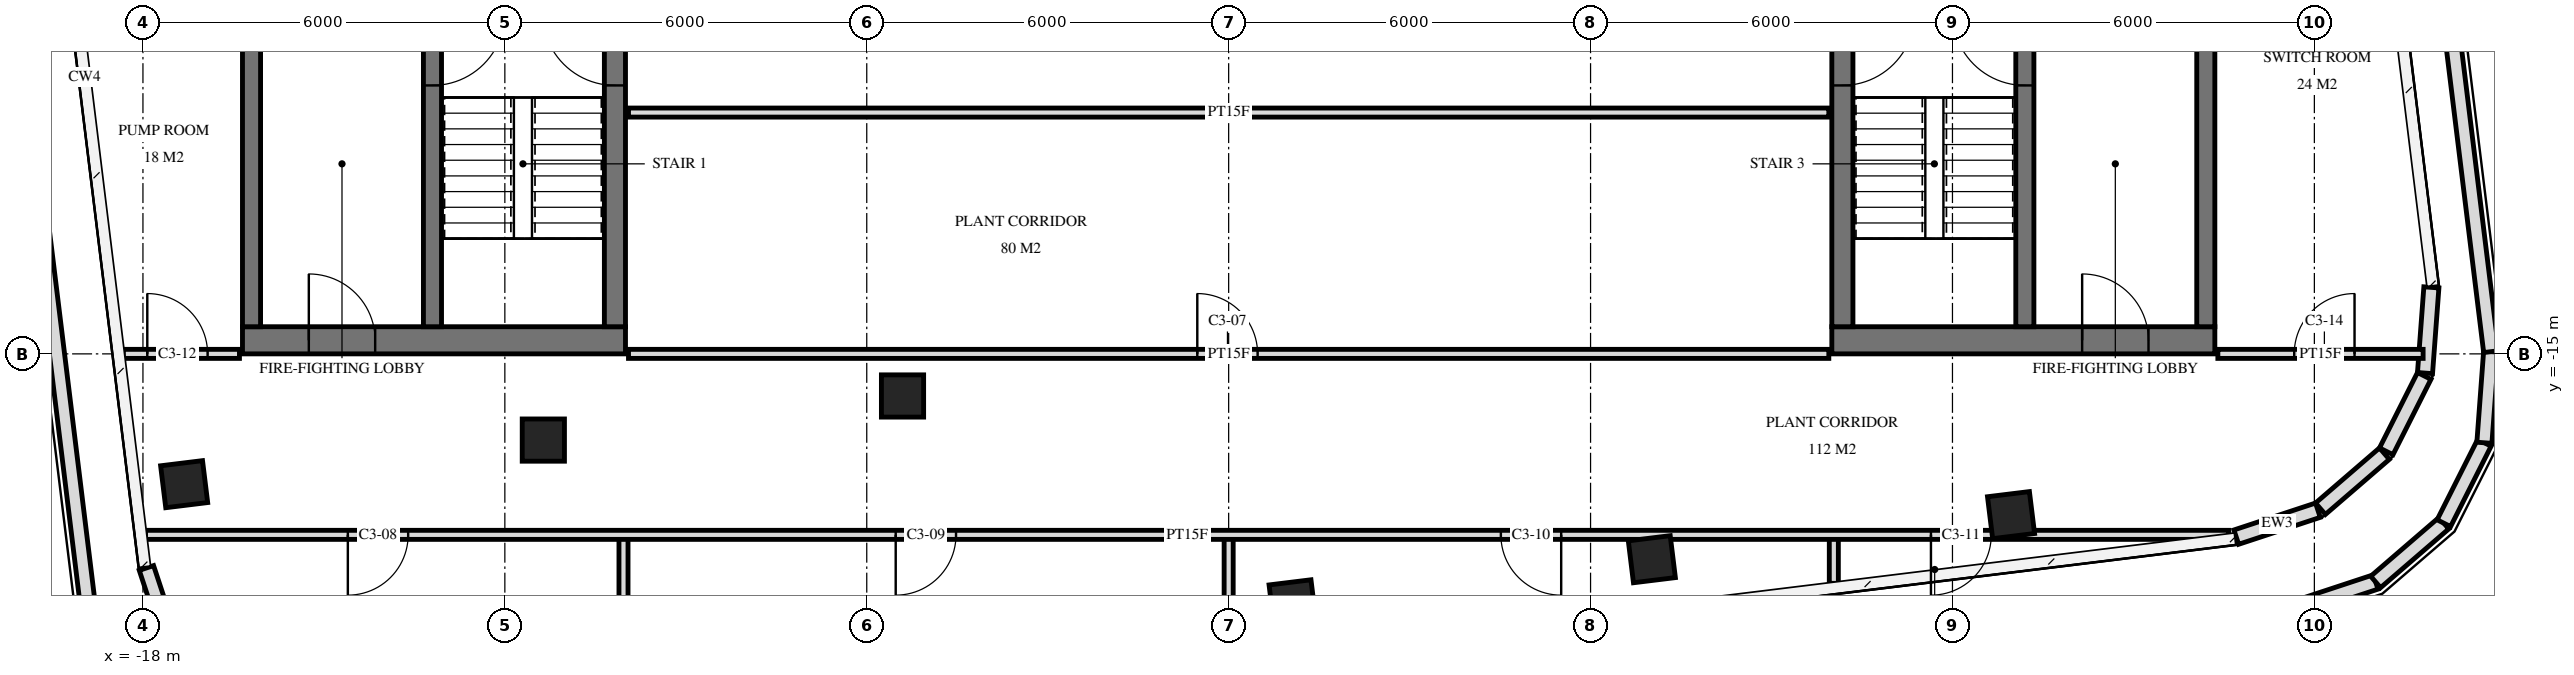
"""IFC4 building model, lengths in metres.
Left out: names, types, materials, properties, quantities, classifications, styles, units other than length and angle.
Written with IfcOpenShell. Run it as: python <this file> out.ifc"""

import sys

from ifc_helpers import new_model, si_unit, direction, frame, frame_2d, origin, origin_2d, place, context, subcontext, project, spatial, rectangle, extrude, element, fill, save


model = new_model("IFC4")
c1 = context("Model", 3, precision=1e-05, world=origin(), true_north=direction((0.0, 1.0)))
c2 = subcontext(c1, "Body", "Model", "MODEL_VIEW")
j1 = project(units=[si_unit("LENGTHUNIT", "METRE"), si_unit("PLANEANGLEUNIT", "RADIAN")], contexts=[c1])
p1 = place(None, origin())
s1 = spatial("IfcSite", under=j1, at=p1, CompositionType="ELEMENT")
p2 = place(p1, origin())
s2 = spatial("IfcBuilding", under=s1, at=p2, CompositionType="ELEMENT")
p3 = place(p2, frame((0.0, 0.0, 353.8)))
s3 = spatial("IfcBuildingStorey", under=s2, at=p3, CompositionType="ELEMENT", Elevation=353.8)
for number, where, z_axis, x_axis in (
    (1, (-17.317, -17.16, 0.0), (0.0, 0.0, 1.0), (-0.122, 0.993, 0.0)),
    (2, (-11.362, -16.429, 0.0), (0.0, 0.0, 1.0), (1.0, 0.0, 0.0)),
    (3, (-5.407, -15.698, 0.0), (0.0, 0.0, 1.0), (1.0, 0.0, 0.0)),
    (4, (1.06, -19.135, 0.0), (0.0, 0.0, 1.0), (0.993, 0.122, 0.0)),
    (5, (7.016, -18.404, 0.0), (0.0, 0.0, 1.0), (0.993, 0.122, 0.0)),
    (6, (12.971, -17.673, 0.0), (0.0, 0.0, 1.0), (0.993, 0.122, 0.0)),
):
    element("IfcColumn", number, at=place(p3, frame(where, z_axis=z_axis, x_axis=x_axis)), inside=s3, PredefinedType="COLUMN", context=c2, shape_type="SweptSolid", body=[
        extrude(rectangle(XDim=0.7, YDim=0.7, at=origin_2d()), origin(), (0.0, 0.0, 1.0), 3.6),
    ])
p4 = place(p3, frame((-16.35, -14.775, 0.0), z_axis=(0.0, 0.0, 1.0), x_axis=(1.0, 0.0, 0.0)))
e7 = element("IfcWall", 7, at=p4, inside=s3, PredefinedType="SHEAR", context=c2, shape_type="SweptSolid", body=[
    extrude(rectangle(XDim=6.35, YDim=0.45, at=frame_2d((3.175, 0.0))), origin(), (0.0, 0.0, 1.0), 3.6),
])
p5 = place(p4, frame((1.1, 0.0, 0.0)))
e8 = element("IfcOpeningElement", 8, at=p5, cuts=e7, PredefinedType="OPENING", context=c2, shape_type="SweptSolid", body=[
    extrude(rectangle(XDim=1.1, YDim=2.1, at=frame_2d((0.55, 1.05))), frame((0.0, 0.235, 0.0), z_axis=(0.0, -1.0, 0.0), x_axis=(1.0, 0.0, 0.0)), (0.0, 0.0, 1.0), 0.47),
])
p6 = place(p3, frame((-10.175, -14.55, 0.0), z_axis=(0.0, 0.0, 1.0), x_axis=(0.0, 1.0, 0.0)))
e9 = element("IfcWall", 9, at=p6, inside=s3, PredefinedType="SHEAR", context=c2, shape_type="SweptSolid", body=[
    extrude(rectangle(XDim=14.1, YDim=0.35, at=frame_2d((7.05, 0.0))), origin(), (0.0, 0.0, 1.0), 3.6),
])
p7 = place(p6, frame((4.0, 0.0, 0.0)))
e10 = element("IfcOpeningElement", 10, at=p7, cuts=e9, PredefinedType="OPENING", context=c2, shape_type="SweptSolid", body=[
    extrude(rectangle(XDim=1.2, YDim=2.1, at=frame_2d((0.6, 1.05))), frame((0.0, 0.185, 0.0), z_axis=(0.0, -1.0, 0.0), x_axis=(1.0, 0.0, 0.0)), (0.0, 0.0, 1.0), 0.37),
])
p8 = place(p3, frame((-16.2, -14.55, 0.0), z_axis=(0.0, 0.0, 1.0), x_axis=(0.0, 1.0, 0.0)))
e11 = element("IfcWall", 11, at=p8, inside=s3, PredefinedType="SHEAR", context=c2, shape_type="SweptSolid", body=[
    extrude(rectangle(XDim=5.4, YDim=0.3, at=frame_2d((2.7, 0.0))), origin(), (0.0, 0.0, 1.0), 3.6),
])
p9 = place(p3, frame((-13.2, -14.55, 0.0), z_axis=(0.0, 0.0, 1.0), x_axis=(0.0, 1.0, 0.0)))
e12 = element("IfcWall", 12, at=p9, inside=s3, PredefinedType="SHEAR", context=c2, shape_type="SweptSolid", body=[
    extrude(rectangle(XDim=5.4, YDim=0.3, at=frame_2d((2.7, 0.0))), origin(), (0.0, 0.0, 1.0), 3.6),
])
p10 = place(p9, frame((4.0, 0.0, 0.0)))
e13 = element("IfcOpeningElement", 13, at=p10, cuts=e12, PredefinedType="OPENING", context=c2, shape_type="SweptSolid", body=[
    extrude(rectangle(XDim=1.2, YDim=2.1, at=frame_2d((0.6, 1.05))), frame((0.0, 0.16, 0.0), z_axis=(0.0, -1.0, 0.0), x_axis=(1.0, 0.0, 0.0)), (0.0, 0.0, 1.0), 0.32),
])
p11 = place(p3, frame((10.0, -14.775, 0.0), z_axis=(0.0, 0.0, 1.0), x_axis=(1.0, 0.0, 0.0)))
e14 = element("IfcWall", 14, at=p11, inside=s3, PredefinedType="SHEAR", context=c2, shape_type="SweptSolid", body=[
    extrude(rectangle(XDim=6.35, YDim=0.45, at=frame_2d((3.175, 0.0))), origin(), (0.0, 0.0, 1.0), 3.6),
])
p12 = place(p11, frame((4.15, 0.0, 0.0)))
e15 = element("IfcOpeningElement", 15, at=p12, cuts=e14, PredefinedType="OPENING", context=c2, shape_type="SweptSolid", body=[
    extrude(rectangle(XDim=1.1, YDim=2.1, at=frame_2d((0.55, 1.05))), frame((0.0, 0.235, 0.0), z_axis=(0.0, -1.0, 0.0), x_axis=(1.0, 0.0, 0.0)), (0.0, 0.0, 1.0), 0.47),
])
p13 = place(p3, frame((10.175, -14.55, 0.0), z_axis=(0.0, 0.0, 1.0), x_axis=(0.0, 1.0, 0.0)))
e16 = element("IfcWall", 16, at=p13, inside=s3, PredefinedType="SHEAR", context=c2, shape_type="SweptSolid", body=[
    extrude(rectangle(XDim=14.1, YDim=0.35, at=frame_2d((7.05, 0.0))), origin(), (0.0, 0.0, 1.0), 3.6),
])
p14 = place(p13, frame((4.0, 0.0, 0.0)))
e17 = element("IfcOpeningElement", 17, at=p14, cuts=e16, PredefinedType="OPENING", context=c2, shape_type="SweptSolid", body=[
    extrude(rectangle(XDim=1.2, YDim=2.1, at=frame_2d((0.6, 1.05))), frame((0.0, 0.185, 0.0), z_axis=(0.0, -1.0, 0.0), x_axis=(1.0, 0.0, 0.0)), (0.0, 0.0, 1.0), 0.37),
])
p15 = place(p3, frame((16.2, -14.55, 0.0), z_axis=(0.0, 0.0, 1.0), x_axis=(0.0, 1.0, 0.0)))
e18 = element("IfcWall", 18, at=p15, inside=s3, PredefinedType="SHEAR", context=c2, shape_type="SweptSolid", body=[
    extrude(rectangle(XDim=5.4, YDim=0.3, at=frame_2d((2.7, 0.0))), origin(), (0.0, 0.0, 1.0), 3.6),
])
p16 = place(p3, frame((13.2, -14.55, 0.0), z_axis=(0.0, 0.0, 1.0), x_axis=(0.0, 1.0, 0.0)))
e19 = element("IfcWall", 19, at=p16, inside=s3, PredefinedType="SHEAR", context=c2, shape_type="SweptSolid", body=[
    extrude(rectangle(XDim=5.4, YDim=0.3, at=frame_2d((2.7, 0.0))), origin(), (0.0, 0.0, 1.0), 3.6),
])
p17 = place(p16, frame((4.0, 0.0, 0.0)))
e20 = element("IfcOpeningElement", 20, at=p17, cuts=e19, PredefinedType="OPENING", context=c2, shape_type="SweptSolid", body=[
    extrude(rectangle(XDim=1.2, YDim=2.1, at=frame_2d((0.6, 1.05))), frame((0.0, 0.16, 0.0), z_axis=(0.0, -1.0, 0.0), x_axis=(1.0, 0.0, 0.0)), (0.0, 0.0, 1.0), 0.32),
])
p18 = place(p3, frame((-17.942, -18.549, 0.0), z_axis=(0.0, 0.0, 1.0), x_axis=(0.313193586641, -0.949689305661, 0.0)))
e21 = element("IfcWall", 21, at=p18, inside=s3, PredefinedType="SOLIDWALL", context=c2, shape_type="SweptSolid", body=[
    extrude(rectangle(XDim=1.425, YDim=0.25, at=frame_2d((0.712, 0.0))), origin(), (0.0, 0.0, 1.0), 3.32),
])
p19 = place(p3, frame((16.706, -18.038, 0.0), z_axis=(0.0, 0.0, 1.0), x_axis=(0.949723461674, 0.313089997199, 0.0)))
e22 = element("IfcWall", 22, at=p19, inside=s3, PredefinedType="SOLIDWALL", context=c2, shape_type="SweptSolid", body=[
    extrude(rectangle(XDim=1.425, YDim=0.25, at=frame_2d((0.712, 0.0))), origin(), (0.0, 0.0, 1.0), 3.32),
])
p20 = place(p3, frame((18.101, -17.567, 0.0), z_axis=(0.0, 0.0, 1.0), x_axis=(0.757579494449, 0.652742912325, 0.0)))
e23 = element("IfcWall", 23, at=p20, inside=s3, PredefinedType="SOLIDWALL", context=c2, shape_type="SweptSolid", body=[
    extrude(rectangle(XDim=1.4, YDim=0.25, at=frame_2d((0.7, 0.0))), origin(), (0.0, 0.0, 1.0), 3.32),
])
p21 = place(p3, frame((19.191, -16.615, 0.0), z_axis=(0.0, 0.0, 1.0), x_axis=(0.450072232014, 0.892992153364, 0.0)))
e24 = element("IfcWall", 24, at=p21, inside=s3, PredefinedType="SOLIDWALL", context=c2, shape_type="SweptSolid", body=[
    extrude(rectangle(XDim=1.399, YDim=0.25, at=frame_2d((0.7, 0.0))), origin(), (0.0, 0.0, 1.0), 3.32),
])
p22 = place(p3, frame((19.834, -15.318, 0.0), z_axis=(0.0, 0.0, 1.0), x_axis=(0.074035815757, 0.99725558308, 0.0)))
e25 = element("IfcWall", 25, at=p22, inside=s3, PredefinedType="SOLIDWALL", context=c2, shape_type="SweptSolid", body=[
    extrude(rectangle(XDim=1.425, YDim=0.25, at=frame_2d((0.712, 0.0))), origin(), (0.0, 0.0, 1.0), 3.32),
])
p23 = place(p3, frame((18.83, 2.145, 0.0), z_axis=(0.0, 0.0, 1.0), x_axis=(0.121867555864, -0.992546371122, 0.0)))
e26 = element("IfcWall", 26, at=p23, inside=s3, PredefinedType="PARAPET", context=c2, shape_type="SweptSolid", body=[
    extrude(rectangle(XDim=17.237, YDim=0.25, at=frame_2d((8.618, 0.0))), origin(), (0.0, 0.0, 1.0), 1.1),
])
p24 = place(p3, frame((20.931, -14.963, 0.0), z_axis=(0.0, 0.0, 1.0), x_axis=(-0.074132878365, -0.997248372446, 0.0)))
e27 = element("IfcWall", 27, at=p24, inside=s3, PredefinedType="PARAPET", context=c2, shape_type="SweptSolid", body=[
    extrude(rectangle(XDim=1.515, YDim=0.25, at=frame_2d((0.757, 0.0))), origin(), (0.0, 0.0, 1.0), 1.1),
])
for number, where, z_axis, x_axis in (
    (28, (20.819, -16.474, 0.0), (0.0, 0.0, 1.0), (-0.45, -0.893, 0.0)),
    (29, (20.147, -17.807, 0.0), (0.0, 0.0, 1.0), (-0.758, -0.653, 0.0)),
):
    element("IfcWall", number, at=place(p3, frame(where, z_axis=z_axis, x_axis=x_axis)), inside=s3, PredefinedType="PARAPET", context=c2, shape_type="SweptSolid", body=[
        extrude(rectangle(XDim=1.492, YDim=0.25, at=frame_2d((0.746, 0.0))), origin(), (0.0, 0.0, 1.0), 1.1),
    ])
p25 = place(p3, frame((19.016, -18.781, 0.0), z_axis=(0.0, 0.0, 1.0), x_axis=(-0.949661734295, -0.313277178257, 0.0)))
e30 = element("IfcWall", 30, at=p25, inside=s3, PredefinedType="PARAPET", context=c2, shape_type="SweptSolid", body=[
    extrude(rectangle(XDim=1.515, YDim=0.25, at=frame_2d((0.757, 0.0))), origin(), (0.0, 0.0, 1.0), 1.1),
])
p26 = place(p3, frame((-18.83, -19.845, 0.0), z_axis=(0.0, 0.0, 1.0), x_axis=(-0.121865842614, 0.992546581478, 0.0)))
e31 = element("IfcWall", 31, at=p26, inside=s3, PredefinedType="PARAPET", context=c2, shape_type="SweptSolid", body=[
    extrude(rectangle(XDim=17.237, YDim=0.25, at=frame_2d((8.618, 0.0))), origin(), (0.0, 0.0, 1.0), 1.1),
])
p27 = place(p3, frame((10.033, -18.804, 0.0), z_axis=(0.0, 0.0, 1.0), x_axis=(0.0, 1.0, 0.0)))
e32 = element("IfcWall", 32, at=p27, inside=s3, PredefinedType="PARTITIONING", context=c2, shape_type="SweptSolid", body=[
    extrude(rectangle(XDim=0.804, YDim=0.15, at=frame_2d((0.402, 0.0))), origin(), (0.0, 0.0, 1.0), 3.32),
])
p28 = place(p3, frame((0.0, -20.036, 0.0), z_axis=(0.0, 0.0, 1.0), x_axis=(0.0, 1.0, 0.0)))
e33 = element("IfcWall", 33, at=p28, inside=s3, PredefinedType="PARTITIONING", context=c2, shape_type="SweptSolid", body=[
    extrude(rectangle(XDim=2.036, YDim=0.15, at=frame_2d((1.018, 0.0))), origin(), (0.0, 0.0, 1.0), 3.32),
])
p29 = place(p3, frame((-10.033, -21.268, 0.0), z_axis=(0.0, 0.0, 1.0), x_axis=(0.0, 1.0, 0.0)))
e34 = element("IfcWall", 34, at=p29, inside=s3, PredefinedType="PARTITIONING", context=c2, shape_type="SweptSolid", body=[
    extrude(rectangle(XDim=3.268, YDim=0.15, at=frame_2d((1.634, 0.0))), origin(), (0.0, 0.0, 1.0), 3.32),
])
p30 = place(p3, frame((-17.957, -18.0, 0.0), z_axis=(0.0, 0.0, 1.0), x_axis=(1.0, 0.0, 0.0)))
e35 = element("IfcWall", 35, at=p30, inside=s3, PredefinedType="PARTITIONING", context=c2, shape_type="SweptSolid", body=[
    extrude(rectangle(XDim=34.538, YDim=0.15, at=frame_2d((17.269, 0.0))), origin(), (0.0, 0.0, 1.0), 3.32),
])
p31 = place(p30, frame((3.354, 0.0, 0.0)))
e36 = element("IfcOpeningElement", 36, at=p31, cuts=e35, PredefinedType="OPENING", context=c2, shape_type="SweptSolid", body=[
    extrude(rectangle(XDim=1.0, YDim=2.1, at=frame_2d((0.5, 1.05))), frame((0.0, 0.085, 0.0), z_axis=(0.0, -1.0, 0.0), x_axis=(1.0, 0.0, 0.0)), (0.0, 0.0, 1.0), 0.17),
])
p32 = place(p30, frame((12.437, 0.0, 0.0)))
e37 = element("IfcOpeningElement", 37, at=p32, cuts=e35, PredefinedType="OPENING", context=c2, shape_type="SweptSolid", body=[
    extrude(rectangle(XDim=1.0, YDim=2.1, at=frame_2d((0.5, 1.05))), frame((0.0, 0.085, 0.0), z_axis=(0.0, -1.0, 0.0), x_axis=(1.0, 0.0, 0.0)), (0.0, 0.0, 1.0), 0.17),
])
p33 = place(p30, frame((22.47, 0.0, 0.0)))
e38 = element("IfcOpeningElement", 38, at=p33, cuts=e35, PredefinedType="OPENING", context=c2, shape_type="SweptSolid", body=[
    extrude(rectangle(XDim=1.0, YDim=2.1, at=frame_2d((0.5, 1.05))), frame((0.0, 0.085, 0.0), z_axis=(0.0, -1.0, 0.0), x_axis=(1.0, 0.0, 0.0)), (0.0, 0.0, 1.0), 0.17),
])
p34 = place(p30, frame((29.6, 0.0, 0.0)))
e39 = element("IfcOpeningElement", 39, at=p34, cuts=e35, PredefinedType="OPENING", context=c2, shape_type="SweptSolid", body=[
    extrude(rectangle(XDim=1.0, YDim=2.1, at=frame_2d((0.5, 1.05))), frame((0.0, 0.085, 0.0), z_axis=(0.0, -1.0, 0.0), x_axis=(1.0, 0.0, 0.0)), (0.0, 0.0, 1.0), 0.17),
])
p35 = place(p3, frame((-18.325, -15.0, 0.0), z_axis=(0.0, 0.0, 1.0), x_axis=(1.0, 0.0, 0.0)))
e40 = element("IfcWall", 40, at=p35, inside=s3, PredefinedType="PARTITIONING", context=c2, shape_type="SweptSolid", body=[
    extrude(rectangle(XDim=1.925, YDim=0.15, at=frame_2d((0.962, 0.0))), origin(), (0.0, 0.0, 1.0), 3.32),
])
p36 = place(p35, frame((0.397, 0.0, 0.0)))
e41 = element("IfcOpeningElement", 41, at=p36, cuts=e40, PredefinedType="OPENING", context=c2, shape_type="SweptSolid", body=[
    extrude(rectangle(XDim=1.0, YDim=2.1, at=frame_2d((0.5, 1.05))), frame((0.0, 0.085, 0.0), z_axis=(0.0, -1.0, 0.0), x_axis=(1.0, 0.0, 0.0)), (0.0, 0.0, 1.0), 0.17),
])
p37 = place(p3, frame((-9.95, -15.0, 0.0), z_axis=(0.0, 0.0, 1.0), x_axis=(1.0, 0.0, 0.0)))
e42 = element("IfcWall", 42, at=p37, inside=s3, PredefinedType="PARTITIONING", context=c2, shape_type="SweptSolid", body=[
    extrude(rectangle(XDim=19.9, YDim=0.15, at=frame_2d((9.95, 0.0))), origin(), (0.0, 0.0, 1.0), 2.684),
])
p38 = place(p37, frame((9.43, 0.0, 0.0)))
e43 = element("IfcOpeningElement", 43, at=p38, cuts=e42, PredefinedType="OPENING", context=c2, shape_type="SweptSolid", body=[
    extrude(rectangle(XDim=1.0, YDim=2.1, at=frame_2d((0.5, 1.05))), frame((0.0, 0.085, 0.0), z_axis=(0.0, -1.0, 0.0), x_axis=(1.0, 0.0, 0.0)), (0.0, 0.0, 1.0), 0.17),
])
p39 = place(p3, frame((16.4, -15.0, 0.0), z_axis=(0.0, 0.0, 1.0), x_axis=(1.0, 0.0, 0.0)))
e44 = element("IfcWall", 44, at=p39, inside=s3, PredefinedType="PARTITIONING", context=c2, shape_type="SweptSolid", body=[
    extrude(rectangle(XDim=3.403, YDim=0.15, at=frame_2d((1.702, 0.0))), origin(), (0.0, 0.0, 1.0), 3.32),
])
p40 = place(p39, frame((1.266, 0.0, 0.0)))
e45 = element("IfcOpeningElement", 45, at=p40, cuts=e44, PredefinedType="OPENING", context=c2, shape_type="SweptSolid", body=[
    extrude(rectangle(XDim=1.0, YDim=2.1, at=frame_2d((0.5, 1.05))), frame((0.0, 0.085, 0.0), z_axis=(0.0, -1.0, 0.0), x_axis=(1.0, 0.0, 0.0)), (0.0, 0.0, 1.0), 0.17),
])
p41 = place(p3, frame((-9.95, -11.0, 0.0), z_axis=(0.0, 0.0, 1.0), x_axis=(1.0, 0.0, 0.0)))
e46 = element("IfcWall", 46, at=p41, inside=s3, PredefinedType="PARTITIONING", context=c2, shape_type="SweptSolid", body=[
    extrude(rectangle(XDim=19.9, YDim=0.15, at=frame_2d((9.95, 0.0))), origin(), (0.0, 0.0, 1.0), 3.32),
])
p42 = place(p7, origin())
e47 = element("IfcDoor", 47, at=p42, inside=s3, OperationType="SINGLE_SWING_LEFT", PredefinedType="DOOR", context=c2, shape_type="SweptSolid", body=[
    extrude(rectangle(XDim=1.2, YDim=2.1, at=frame_2d((0.6, 1.05))), frame((0.0, 0.025, 0.0), z_axis=(0.0, -1.0, 0.0), x_axis=(1.0, 0.0, 0.0)), (0.0, 0.0, 1.0), 0.05),
])
fill(e10, e47)
p43 = place(p5, origin())
e48 = element("IfcDoor", 48, at=p43, inside=s3, OperationType="SINGLE_SWING_RIGHT", PredefinedType="DOOR", context=c2, shape_type="SweptSolid", body=[
    extrude(rectangle(XDim=1.1, YDim=2.1, at=frame_2d((0.55, 1.05))), frame((0.0, 0.025, 0.0), z_axis=(0.0, -1.0, 0.0), x_axis=(1.0, 0.0, 0.0)), (0.0, 0.0, 1.0), 0.05),
])
fill(e8, e48)
p44 = place(p10, frame((0.6, 0.0, 0.0), z_axis=(0.0, 0.0, 1.0), x_axis=(-1.0, 0.0, 0.0)))
e49 = element("IfcDoor", 49, at=p44, inside=s3, OperationType="SINGLE_SWING_RIGHT", PredefinedType="DOOR", context=c2, shape_type="SweptSolid", body=[
    extrude(rectangle(XDim=1.2, YDim=2.1, at=frame_2d((0.0, 1.05))), frame((0.0, -0.025, 0.0), z_axis=(0.0, 1.0, 0.0), x_axis=(-1.0, 0.0, 0.0)), (0.0, 0.0, 1.0), 0.05),
])
fill(e13, e49)
p45 = place(p14, frame((0.6, 0.0, 0.0), z_axis=(0.0, 0.0, 1.0), x_axis=(-1.0, 0.0, 0.0)))
e50 = element("IfcDoor", 50, at=p45, inside=s3, OperationType="SINGLE_SWING_RIGHT", PredefinedType="DOOR", context=c2, shape_type="SweptSolid", body=[
    extrude(rectangle(XDim=1.2, YDim=2.1, at=frame_2d((0.0, 1.05))), frame((0.0, -0.025, 0.0), z_axis=(0.0, 1.0, 0.0), x_axis=(-1.0, 0.0, 0.0)), (0.0, 0.0, 1.0), 0.05),
])
fill(e17, e50)
p46 = place(p12, origin())
e51 = element("IfcDoor", 51, at=p46, inside=s3, OperationType="SINGLE_SWING_RIGHT", PredefinedType="DOOR", context=c2, shape_type="SweptSolid", body=[
    extrude(rectangle(XDim=1.1, YDim=2.1, at=frame_2d((0.55, 1.05))), frame((0.0, 0.025, 0.0), z_axis=(0.0, -1.0, 0.0), x_axis=(1.0, 0.0, 0.0)), (0.0, 0.0, 1.0), 0.05),
])
fill(e15, e51)
p47 = place(p17, origin())
e52 = element("IfcDoor", 52, at=p47, inside=s3, OperationType="SINGLE_SWING_LEFT", PredefinedType="DOOR", context=c2, shape_type="SweptSolid", body=[
    extrude(rectangle(XDim=1.2, YDim=2.1, at=frame_2d((0.6, 1.05))), frame((0.0, 0.025, 0.0), z_axis=(0.0, -1.0, 0.0), x_axis=(1.0, 0.0, 0.0)), (0.0, 0.0, 1.0), 0.05),
])
fill(e20, e52)
p48 = place(p38, origin())
e53 = element("IfcDoor", 53, at=p48, inside=s3, OperationType="SINGLE_SWING_RIGHT", PredefinedType="DOOR", context=c2, shape_type="SweptSolid", body=[
    extrude(rectangle(XDim=1.0, YDim=2.1, at=frame_2d((0.5, 1.05))), frame((0.0, 0.025, 0.0), z_axis=(0.0, -1.0, 0.0), x_axis=(1.0, 0.0, 0.0)), (0.0, 0.0, 1.0), 0.05),
])
fill(e43, e53)
p49 = place(p31, frame((0.5, 0.0, 0.0), z_axis=(0.0, 0.0, 1.0), x_axis=(-1.0, 0.0, 0.0)))
e54 = element("IfcDoor", 54, at=p49, inside=s3, OperationType="SINGLE_SWING_LEFT", PredefinedType="DOOR", context=c2, shape_type="SweptSolid", body=[
    extrude(rectangle(XDim=1.0, YDim=2.1, at=frame_2d((0.0, 1.05))), frame((0.0, -0.025, 0.0), z_axis=(0.0, 1.0, 0.0), x_axis=(-1.0, 0.0, 0.0)), (0.0, 0.0, 1.0), 0.05),
])
fill(e36, e54)
p50 = place(p32, frame((0.5, 0.0, 0.0), z_axis=(0.0, 0.0, 1.0), x_axis=(-1.0, 0.0, 0.0)))
e55 = element("IfcDoor", 55, at=p50, inside=s3, OperationType="SINGLE_SWING_LEFT", PredefinedType="DOOR", context=c2, shape_type="SweptSolid", body=[
    extrude(rectangle(XDim=1.0, YDim=2.1, at=frame_2d((0.0, 1.05))), frame((0.0, -0.025, 0.0), z_axis=(0.0, 1.0, 0.0), x_axis=(-1.0, 0.0, 0.0)), (0.0, 0.0, 1.0), 0.05),
])
fill(e37, e55)
p51 = place(p33, frame((0.5, 0.0, 0.0), z_axis=(0.0, 0.0, 1.0), x_axis=(-1.0, 0.0, 0.0)))
e56 = element("IfcDoor", 56, at=p51, inside=s3, OperationType="SINGLE_SWING_RIGHT", PredefinedType="DOOR", context=c2, shape_type="SweptSolid", body=[
    extrude(rectangle(XDim=1.0, YDim=2.1, at=frame_2d((0.0, 1.05))), frame((0.0, -0.025, 0.0), z_axis=(0.0, 1.0, 0.0), x_axis=(-1.0, 0.0, 0.0)), (0.0, 0.0, 1.0), 0.05),
])
fill(e38, e56)
p52 = place(p34, frame((0.5, 0.0, 0.0), z_axis=(0.0, 0.0, 1.0), x_axis=(-1.0, 0.0, 0.0)))
e57 = element("IfcDoor", 57, at=p52, inside=s3, OperationType="SINGLE_SWING_LEFT", PredefinedType="DOOR", context=c2, shape_type="SweptSolid", body=[
    extrude(rectangle(XDim=1.0, YDim=2.1, at=frame_2d((0.0, 1.05))), frame((0.0, -0.025, 0.0), z_axis=(0.0, 1.0, 0.0), x_axis=(-1.0, 0.0, 0.0)), (0.0, 0.0, 1.0), 0.05),
])
fill(e39, e57)
p53 = place(p36, origin())
e58 = element("IfcDoor", 58, at=p53, inside=s3, OperationType="SINGLE_SWING_RIGHT", PredefinedType="DOOR", context=c2, shape_type="SweptSolid", body=[
    extrude(rectangle(XDim=1.0, YDim=2.1, at=frame_2d((0.5, 1.05))), frame((0.0, 0.025, 0.0), z_axis=(0.0, -1.0, 0.0), x_axis=(1.0, 0.0, 0.0)), (0.0, 0.0, 1.0), 0.05),
])
fill(e41, e58)
p54 = place(p40, origin())
e59 = element("IfcDoor", 59, at=p54, inside=s3, OperationType="SINGLE_SWING_LEFT", PredefinedType="DOOR", context=c2, shape_type="SweptSolid", body=[
    extrude(rectangle(XDim=1.0, YDim=2.1, at=frame_2d((0.5, 1.05))), frame((0.0, 0.025, 0.0), z_axis=(0.0, -1.0, 0.0), x_axis=(1.0, 0.0, 0.0)), (0.0, 0.0, 1.0), 0.05),
])
fill(e45, e59)
save(model, sys.argv[1])
